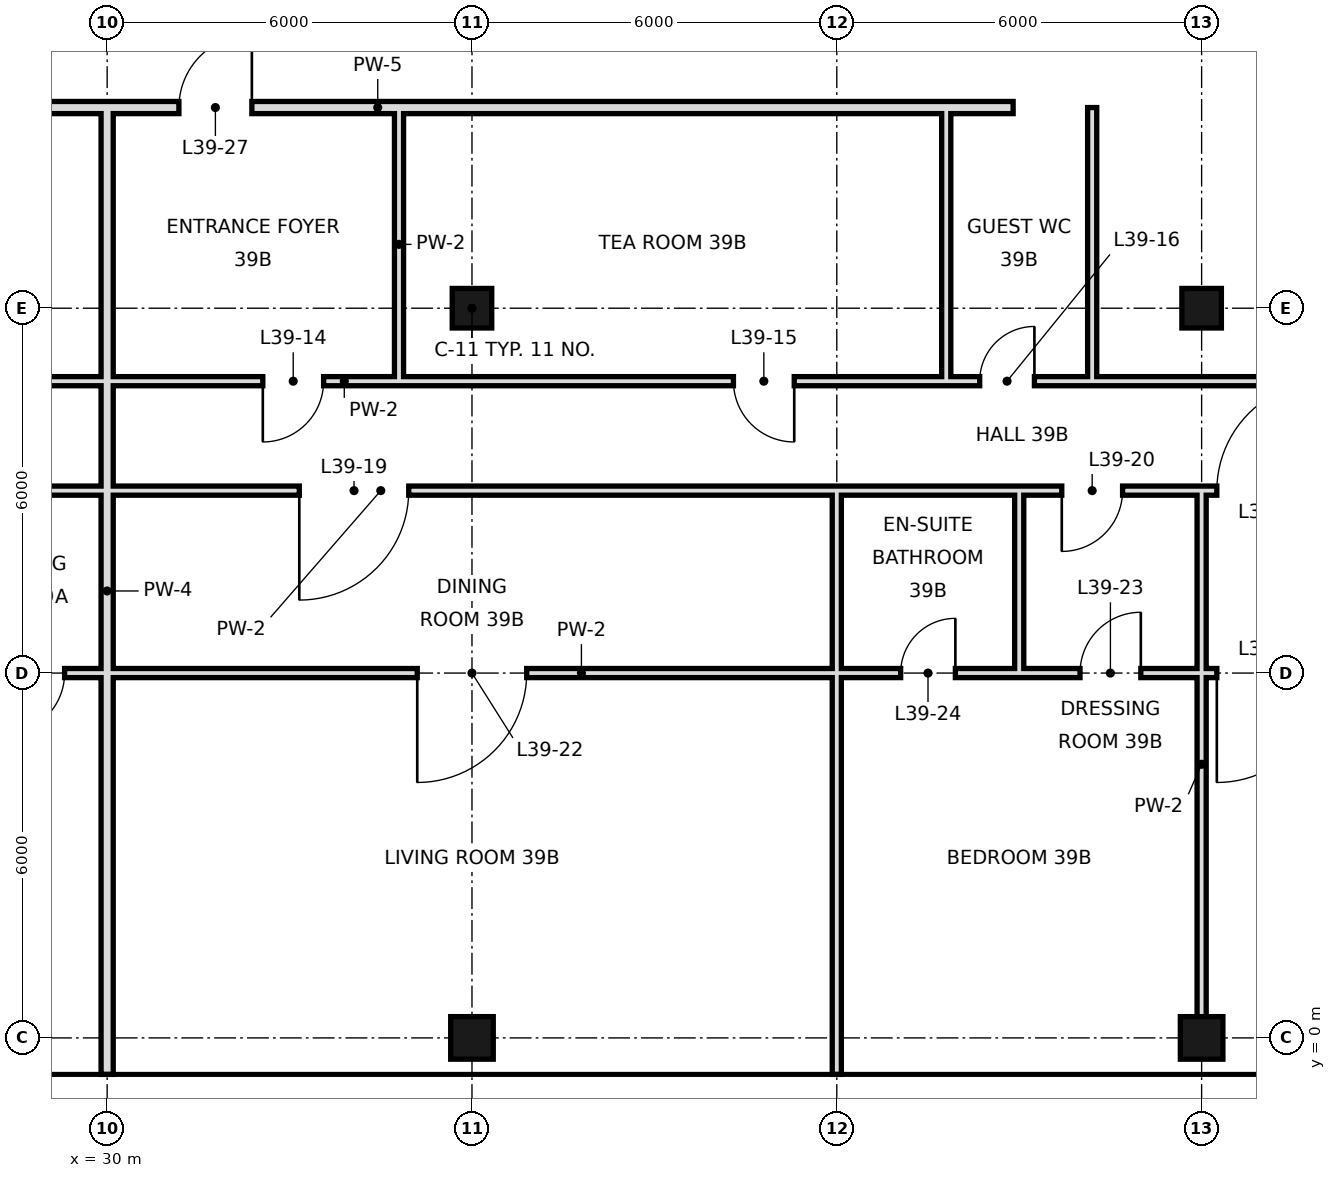
"""IFC4 building model, lengths in metres.
Left out: names, types, materials, properties, quantities, classifications, styles, units other than length and angle.
Written with IfcOpenShell. Run it as: python <this file> out.ifc"""

import sys

from ifc_helpers import new_model, si_unit, direction, frame, frame_2d, origin, origin_2d, place, context, subcontext, project, spatial, rectangle, hollow_rectangle, extrude, element, fill, save


model = new_model("IFC4")
c1 = context("Model", 3, precision=1e-05, world=origin(), true_north=direction((0.0, 1.0)))
c2 = subcontext(c1, "Body", "Model", "MODEL_VIEW")
j1 = project(units=[si_unit("LENGTHUNIT", "METRE"), si_unit("PLANEANGLEUNIT", "RADIAN")], contexts=[c1])
p1 = place(None, origin())
s1 = spatial("IfcSite", under=j1, at=p1, CompositionType="ELEMENT")
p2 = place(p1, origin())
s2 = spatial("IfcBuilding", under=s1, at=p2, CompositionType="ELEMENT")
p3 = place(p2, frame((0.0, 0.0, 170.8)))
s3 = spatial("IfcBuildingStorey", under=s2, at=p3, CompositionType="ELEMENT", Elevation=170.8)
p4 = place(p3, frame((36.0, 0.0, 0.0), z_axis=(0.0, 0.0, 1.0), x_axis=(1.0, 0.0, 0.0)))
e1 = element("IfcColumn", 1, at=p4, inside=s3, PredefinedType="COLUMN", context=c2, shape_type="SweptSolid", body=[
    extrude(hollow_rectangle(XDim=0.7, YDim=0.7, WallThickness=0.036, at=origin_2d()), origin(), (0.0, 0.0, 1.0), 3.6),
])
p5 = place(p3, frame((36.0, 12.0, 0.0), z_axis=(0.0, 0.0, 1.0), x_axis=(1.0, 0.0, 0.0)))
e2 = element("IfcColumn", 2, at=p5, inside=s3, PredefinedType="COLUMN", context=c2, shape_type="SweptSolid", body=[
    extrude(hollow_rectangle(XDim=0.65, YDim=0.65, WallThickness=0.032, at=origin_2d()), origin(), (0.0, 0.0, 1.0), 3.6),
])
p6 = place(p3, frame((48.0, 0.0, 0.0), z_axis=(0.0, 0.0, 1.0), x_axis=(1.0, 0.0, 0.0)))
e3 = element("IfcColumn", 3, at=p6, inside=s3, PredefinedType="COLUMN", context=c2, shape_type="SweptSolid", body=[
    extrude(hollow_rectangle(XDim=0.7, YDim=0.7, WallThickness=0.036, at=origin_2d()), origin(), (0.0, 0.0, 1.0), 3.6),
])
p7 = place(p3, frame((48.0, 12.0, 0.0), z_axis=(0.0, 0.0, 1.0), x_axis=(1.0, 0.0, 0.0)))
e4 = element("IfcColumn", 4, at=p7, inside=s3, PredefinedType="COLUMN", context=c2, shape_type="SweptSolid", body=[
    extrude(hollow_rectangle(XDim=0.65, YDim=0.65, WallThickness=0.032, at=origin_2d()), origin(), (0.0, 0.0, 1.0), 3.6),
])
p8 = place(p3, frame((30.0, -0.6, 0.0), z_axis=(0.0, 0.0, 1.0), x_axis=(0.0, 1.0, 0.0)))
e5 = element("IfcWall", 5, at=p8, inside=s3, PredefinedType="SOLIDWALL", context=c2, shape_type="SweptSolid", body=[
    extrude(rectangle(XDim=15.9, YDim=0.2, at=frame_2d((7.95, 0.0))), origin(), (0.0, 0.0, 1.0), 2.72),
])
p9 = place(p3, frame((34.8, 10.8, 0.0), z_axis=(0.0, 0.0, 1.0), x_axis=(0.0, 1.0, 0.0)))
e6 = element("IfcWall", 6, at=p9, inside=s3, PredefinedType="PARTITIONING", context=c2, shape_type="SweptSolid", body=[
    extrude(rectangle(XDim=4.5, YDim=0.15, at=frame_2d((2.25, 0.0))), origin(), (0.0, 0.0, 1.0), 3.42),
])
p10 = place(p3, frame((42.0, -0.6, 0.0), z_axis=(0.0, 0.0, 1.0), x_axis=(0.0, 1.0, 0.0)))
e7 = element("IfcWall", 7, at=p10, inside=s3, PredefinedType="PARTITIONING", context=c2, shape_type="SweptSolid", body=[
    extrude(rectangle(XDim=6.6, YDim=0.15, at=frame_2d((3.3, 0.0))), origin(), (0.0, 0.0, 1.0), 2.72),
])
p11 = place(p3, frame((42.0, 6.0, 0.0), z_axis=(0.0, 0.0, 1.0), x_axis=(0.0, 1.0, 0.0)))
e8 = element("IfcWall", 8, at=p11, inside=s3, PredefinedType="PARTITIONING", context=c2, shape_type="SweptSolid", body=[
    extrude(rectangle(XDim=3.0, YDim=0.15, at=frame_2d((1.5, 0.0))), origin(), (0.0, 0.0, 1.0), 2.72),
])
p12 = place(p3, frame((43.8, 10.8, 0.0), z_axis=(0.0, 0.0, 1.0), x_axis=(0.0, 1.0, 0.0)))
e9 = element("IfcWall", 9, at=p12, inside=s3, PredefinedType="PARTITIONING", context=c2, shape_type="SweptSolid", body=[
    extrude(rectangle(XDim=4.5, YDim=0.15, at=frame_2d((2.25, 0.0))), origin(), (0.0, 0.0, 1.0), 3.42),
])
p13 = place(p3, frame((45.0, 6.0, 0.0), z_axis=(0.0, 0.0, 1.0), x_axis=(0.0, 1.0, 0.0)))
e10 = element("IfcWall", 10, at=p13, inside=s3, PredefinedType="PARTITIONING", context=c2, shape_type="SweptSolid", body=[
    extrude(rectangle(XDim=3.0, YDim=0.15, at=frame_2d((1.5, 0.0))), origin(), (0.0, 0.0, 1.0), 3.42),
])
p14 = place(p3, frame((46.2, 10.8, 0.0), z_axis=(0.0, 0.0, 1.0), x_axis=(0.0, 1.0, 0.0)))
e11 = element("IfcWall", 11, at=p14, inside=s3, PredefinedType="PARTITIONING", context=c2, shape_type="SweptSolid", body=[
    extrude(rectangle(XDim=4.5, YDim=0.15, at=frame_2d((2.25, 0.0))), origin(), (0.0, 0.0, 1.0), 3.42),
])
p15 = place(p3, frame((48.0, 0.0, 0.0), z_axis=(0.0, 0.0, 1.0), x_axis=(0.0, 1.0, 0.0)))
e12 = element("IfcWall", 12, at=p15, inside=s3, PredefinedType="PARTITIONING", context=c2, shape_type="SweptSolid", body=[
    extrude(rectangle(XDim=9.0, YDim=0.15, at=frame_2d((4.5, 0.0))), origin(), (0.0, 0.0, 1.0), 2.72),
])
p16 = place(p3, frame((24.0, 10.8, 0.0), z_axis=(0.0, 0.0, 1.0), x_axis=(1.0, 0.0, 0.0)))
e13 = element("IfcWall", 13, at=p16, inside=s3, PredefinedType="PARTITIONING", context=c2, shape_type="SweptSolid", body=[
    extrude(rectangle(XDim=19.8, YDim=0.15, at=frame_2d((9.9, 0.0))), origin(), (0.0, 0.0, 1.0), 3.42),
])
p17 = place(p16, frame((2.5, 0.0, 0.0)))
e14 = element("IfcOpeningElement", 14, at=p17, cuts=e13, PredefinedType="OPENING", context=c2, shape_type="SweptSolid", body=[
    extrude(rectangle(XDim=1.0, YDim=2.4, at=frame_2d((0.5, 1.2))), frame((0.0, 0.085, 0.0), z_axis=(0.0, -1.0, 0.0), x_axis=(1.0, 0.0, 0.0)), (0.0, 0.0, 1.0), 0.17),
])
p18 = place(p16, frame((8.56, 0.0, 0.0)))
e15 = element("IfcOpeningElement", 15, at=p18, cuts=e13, PredefinedType="OPENING", context=c2, shape_type="SweptSolid", body=[
    extrude(rectangle(XDim=1.0, YDim=2.4, at=frame_2d((0.5, 1.2))), frame((0.0, 0.085, 0.0), z_axis=(0.0, -1.0, 0.0), x_axis=(1.0, 0.0, 0.0)), (0.0, 0.0, 1.0), 0.17),
])
p19 = place(p16, frame((16.3, 0.0, 0.0)))
e16 = element("IfcOpeningElement", 16, at=p19, cuts=e13, PredefinedType="OPENING", context=c2, shape_type="SweptSolid", body=[
    extrude(rectangle(XDim=1.0, YDim=2.4, at=frame_2d((0.5, 1.2))), frame((0.0, 0.085, 0.0), z_axis=(0.0, -1.0, 0.0), x_axis=(1.0, 0.0, 0.0)), (0.0, 0.0, 1.0), 0.17),
])
p20 = place(p3, frame((46.2, 10.8, 0.0), z_axis=(0.0, 0.0, 1.0), x_axis=(1.0, 0.0, 0.0)))
e17 = element("IfcWall", 17, at=p20, inside=s3, PredefinedType="PARTITIONING", context=c2, shape_type="SweptSolid", body=[
    extrude(rectangle(XDim=9.0, YDim=0.15, at=frame_2d((4.5, 0.0))), origin(), (0.0, 0.0, 1.0), 3.42),
])
p21 = place(p20, frame((5.5, 0.0, 0.0)))
e18 = element("IfcOpeningElement", 18, at=p21, cuts=e17, PredefinedType="OPENING", context=c2, shape_type="SweptSolid", body=[
    extrude(rectangle(XDim=1.0, YDim=2.4, at=frame_2d((0.5, 1.2))), frame((0.0, 0.085, 0.0), z_axis=(0.0, -1.0, 0.0), x_axis=(1.0, 0.0, 0.0)), (0.0, 0.0, 1.0), 0.17),
])
p22 = place(p3, frame((43.8, 10.8, 0.0), z_axis=(0.0, 0.0, 1.0), x_axis=(1.0, 0.0, 0.0)))
e19 = element("IfcWall", 19, at=p22, inside=s3, PredefinedType="PARTITIONING", context=c2, shape_type="SweptSolid", body=[
    extrude(rectangle(XDim=2.4, YDim=0.15, at=frame_2d((1.2, 0.0))), origin(), (0.0, 0.0, 1.0), 3.42),
])
p23 = place(p22, frame((0.55, 0.0, 0.0)))
e20 = element("IfcOpeningElement", 20, at=p23, cuts=e19, PredefinedType="OPENING", context=c2, shape_type="SweptSolid", body=[
    extrude(rectangle(XDim=0.9, YDim=2.4, at=frame_2d((0.45, 1.2))), frame((0.0, 0.085, 0.0), z_axis=(0.0, -1.0, 0.0), x_axis=(1.0, 0.0, 0.0)), (0.0, 0.0, 1.0), 0.17),
])
p24 = place(p3, frame((24.0, 15.3, 0.0), z_axis=(0.0, 0.0, 1.0), x_axis=(1.0, 0.0, 0.0)))
e21 = element("IfcWall", 21, at=p24, inside=s3, PredefinedType="SOLIDWALL", context=c2, shape_type="SweptSolid", body=[
    extrude(rectangle(XDim=20.9, YDim=0.2, at=frame_2d((10.45, 0.0))), origin(), (0.0, 0.0, 1.0), 2.72),
])
p25 = place(p24, frame((3.26, 0.0, 0.0)))
e22 = element("IfcOpeningElement", 22, at=p25, cuts=e21, PredefinedType="OPENING", context=c2, shape_type="SweptSolid", body=[
    extrude(rectangle(XDim=1.2, YDim=2.4, at=frame_2d((0.6, 1.2))), frame((0.0, 0.11, 0.0), z_axis=(0.0, -1.0, 0.0), x_axis=(1.0, 0.0, 0.0)), (0.0, 0.0, 1.0), 0.22),
])
p26 = place(p24, frame((7.18, 0.0, 0.0)))
e23 = element("IfcOpeningElement", 23, at=p26, cuts=e21, PredefinedType="OPENING", context=c2, shape_type="SweptSolid", body=[
    extrude(rectangle(XDim=1.2, YDim=2.4, at=frame_2d((0.6, 1.2))), frame((0.0, 0.11, 0.0), z_axis=(0.0, -1.0, 0.0), x_axis=(1.0, 0.0, 0.0)), (0.0, 0.0, 1.0), 0.22),
])
p27 = place(p3, frame((27.0, 6.0, 0.0), z_axis=(0.0, 0.0, 1.0), x_axis=(1.0, 0.0, 0.0)))
e24 = element("IfcWall", 24, at=p27, inside=s3, PredefinedType="PARTITIONING", context=c2, shape_type="SweptSolid", body=[
    extrude(rectangle(XDim=15.0, YDim=0.15, at=frame_2d((7.5, 0.0))), origin(), (0.0, 0.0, 1.0), 2.97),
])
p28 = place(p27, frame((1.3, 0.0, 0.0)))
e25 = element("IfcOpeningElement", 25, at=p28, cuts=e24, PredefinedType="OPENING", context=c2, shape_type="SweptSolid", body=[
    extrude(rectangle(XDim=1.0, YDim=2.4, at=frame_2d((0.5, 1.2))), frame((0.0, 0.085, 0.0), z_axis=(0.0, -1.0, 0.0), x_axis=(1.0, 0.0, 0.0)), (0.0, 0.0, 1.0), 0.17),
])
p29 = place(p27, frame((8.1, 0.0, 0.0)))
e26 = element("IfcOpeningElement", 26, at=p29, cuts=e24, PredefinedType="OPENING", context=c2, shape_type="SweptSolid", body=[
    extrude(rectangle(XDim=1.8, YDim=2.4, at=frame_2d((0.9, 1.2))), frame((0.0, 0.085, 0.0), z_axis=(0.0, -1.0, 0.0), x_axis=(1.0, 0.0, 0.0)), (0.0, 0.0, 1.0), 0.17),
])
p30 = place(p3, frame((45.0, 6.0, 0.0), z_axis=(0.0, 0.0, 1.0), x_axis=(1.0, 0.0, 0.0)))
e27 = element("IfcWall", 27, at=p30, inside=s3, PredefinedType="PARTITIONING", context=c2, shape_type="SweptSolid", body=[
    extrude(rectangle(XDim=15.0, YDim=0.15, at=frame_2d((7.5, 0.0))), origin(), (0.0, 0.0, 1.0), 2.72),
])
p31 = place(p30, frame((1.0, 0.0, 0.0)))
e28 = element("IfcOpeningElement", 28, at=p31, cuts=e27, PredefinedType="OPENING", context=c2, shape_type="SweptSolid", body=[
    extrude(rectangle(XDim=1.0, YDim=2.4, at=frame_2d((0.5, 1.2))), frame((0.0, 0.085, 0.0), z_axis=(0.0, -1.0, 0.0), x_axis=(1.0, 0.0, 0.0)), (0.0, 0.0, 1.0), 0.17),
])
p32 = place(p30, frame((3.25, 0.0, 0.0)))
e29 = element("IfcOpeningElement", 29, at=p32, cuts=e27, PredefinedType="OPENING", context=c2, shape_type="SweptSolid", body=[
    extrude(rectangle(XDim=1.8, YDim=2.4, at=frame_2d((0.9, 1.2))), frame((0.0, 0.085, 0.0), z_axis=(0.0, -1.0, 0.0), x_axis=(1.0, 0.0, 0.0)), (0.0, 0.0, 1.0), 0.17),
])
p33 = place(p3, frame((42.0, 6.0, 0.0), z_axis=(0.0, 0.0, 1.0), x_axis=(1.0, 0.0, 0.0)))
e30 = element("IfcWall", 30, at=p33, inside=s3, PredefinedType="PARTITIONING", context=c2, shape_type="SweptSolid", body=[
    extrude(rectangle(XDim=3.0, YDim=0.15, at=frame_2d((1.5, 0.0))), origin(), (0.0, 0.0, 1.0), 2.97),
])
p34 = place(p33, frame((1.05, 0.0, 0.0)))
e31 = element("IfcOpeningElement", 31, at=p34, cuts=e30, PredefinedType="OPENING", context=c2, shape_type="SweptSolid", body=[
    extrude(rectangle(XDim=0.9, YDim=2.4, at=frame_2d((0.45, 1.2))), frame((0.0, 0.085, 0.0), z_axis=(0.0, -1.0, 0.0), x_axis=(1.0, 0.0, 0.0)), (0.0, 0.0, 1.0), 0.17),
])
p35 = place(p3, frame((27.0, 9.0, 0.0), z_axis=(0.0, 0.0, 1.0), x_axis=(1.0, 0.0, 0.0)))
e32 = element("IfcWall", 32, at=p35, inside=s3, PredefinedType="PARTITIONING", context=c2, shape_type="SweptSolid", body=[
    extrude(rectangle(XDim=15.0, YDim=0.15, at=frame_2d((7.5, 0.0))), origin(), (0.0, 0.0, 1.0), 3.42),
])
p36 = place(p35, frame((1.0, 0.0, 0.0)))
e33 = element("IfcOpeningElement", 33, at=p36, cuts=e32, PredefinedType="OPENING", context=c2, shape_type="SweptSolid", body=[
    extrude(rectangle(XDim=1.0, YDim=2.4, at=frame_2d((0.5, 1.2))), frame((0.0, 0.085, 0.0), z_axis=(0.0, -1.0, 0.0), x_axis=(1.0, 0.0, 0.0)), (0.0, 0.0, 1.0), 0.17),
])
p37 = place(p35, frame((6.16, 0.0, 0.0)))
e34 = element("IfcOpeningElement", 34, at=p37, cuts=e32, PredefinedType="OPENING", context=c2, shape_type="SweptSolid", body=[
    extrude(rectangle(XDim=1.8, YDim=2.4, at=frame_2d((0.9, 1.2))), frame((0.0, 0.085, 0.0), z_axis=(0.0, -1.0, 0.0), x_axis=(1.0, 0.0, 0.0)), (0.0, 0.0, 1.0), 0.17),
])
p38 = place(p3, frame((45.0, 9.0, 0.0), z_axis=(0.0, 0.0, 1.0), x_axis=(1.0, 0.0, 0.0)))
e35 = element("IfcWall", 35, at=p38, inside=s3, PredefinedType="PARTITIONING", context=c2, shape_type="SweptSolid", body=[
    extrude(rectangle(XDim=15.6, YDim=0.15, at=frame_2d((7.8, 0.0))), origin(), (0.0, 0.0, 1.0), 3.42),
])
p39 = place(p38, frame((0.7, 0.0, 0.0)))
e36 = element("IfcOpeningElement", 36, at=p39, cuts=e35, PredefinedType="OPENING", context=c2, shape_type="SweptSolid", body=[
    extrude(rectangle(XDim=1.0, YDim=2.4, at=frame_2d((0.5, 1.2))), frame((0.0, 0.085, 0.0), z_axis=(0.0, -1.0, 0.0), x_axis=(1.0, 0.0, 0.0)), (0.0, 0.0, 1.0), 0.17),
])
p40 = place(p38, frame((3.25, 0.0, 0.0)))
e37 = element("IfcOpeningElement", 37, at=p40, cuts=e35, PredefinedType="OPENING", context=c2, shape_type="SweptSolid", body=[
    extrude(rectangle(XDim=1.8, YDim=2.4, at=frame_2d((0.9, 1.2))), frame((0.0, 0.085, 0.0), z_axis=(0.0, -1.0, 0.0), x_axis=(1.0, 0.0, 0.0)), (0.0, 0.0, 1.0), 0.17),
])
p41 = place(p3, frame((42.0, 9.0, 0.0), z_axis=(0.0, 0.0, 1.0), x_axis=(1.0, 0.0, 0.0)))
e38 = element("IfcWall", 38, at=p41, inside=s3, PredefinedType="PARTITIONING", context=c2, shape_type="SweptSolid", body=[
    extrude(rectangle(XDim=3.0, YDim=0.15, at=frame_2d((1.5, 0.0))), origin(), (0.0, 0.0, 1.0), 3.42),
])
p42 = place(p28, frame((1.0, 0.0, 0.0), z_axis=(0.0, 0.0, 1.0), x_axis=(-1.0, 0.0, 0.0)))
e39 = element("IfcDoor", 39, at=p42, inside=s3, OperationType="SINGLE_SWING_RIGHT", PredefinedType="DOOR", context=c2, shape_type="SweptSolid", body=[
    extrude(rectangle(XDim=1.0, YDim=2.4, at=frame_2d((0.5, 1.2))), frame((0.0, 0.025, 0.0), z_axis=(0.0, -1.0, 0.0), x_axis=(1.0, 0.0, 0.0)), (0.0, 0.0, 1.0), 0.05),
])
fill(e25, e39)
p43 = place(p18, frame((1.0, 0.0, 0.0), z_axis=(0.0, 0.0, 1.0), x_axis=(-1.0, 0.0, 0.0)))
e40 = element("IfcDoor", 40, at=p43, inside=s3, OperationType="SINGLE_SWING_RIGHT", PredefinedType="DOOR", context=c2, shape_type="SweptSolid", body=[
    extrude(rectangle(XDim=1.0, YDim=2.4, at=frame_2d((0.5, 1.2))), frame((0.0, 0.025, 0.0), z_axis=(0.0, -1.0, 0.0), x_axis=(1.0, 0.0, 0.0)), (0.0, 0.0, 1.0), 0.05),
])
fill(e15, e40)
p44 = place(p19, origin())
e41 = element("IfcDoor", 41, at=p44, inside=s3, OperationType="SINGLE_SWING_RIGHT", PredefinedType="DOOR", context=c2, shape_type="SweptSolid", body=[
    extrude(rectangle(XDim=1.0, YDim=2.4, at=frame_2d((0.5, 1.2))), frame((0.0, 0.025, 0.0), z_axis=(0.0, -1.0, 0.0), x_axis=(1.0, 0.0, 0.0)), (0.0, 0.0, 1.0), 0.05),
])
fill(e16, e41)
p45 = place(p23, frame((0.9, 0.0, 0.0), z_axis=(0.0, 0.0, 1.0), x_axis=(-1.0, 0.0, 0.0)))
e42 = element("IfcDoor", 42, at=p45, inside=s3, OperationType="SINGLE_SWING_LEFT", PredefinedType="DOOR", context=c2, shape_type="SweptSolid", body=[
    extrude(rectangle(XDim=0.9, YDim=2.4, at=frame_2d((0.45, 1.2))), frame((0.0, 0.025, 0.0), z_axis=(0.0, -1.0, 0.0), x_axis=(1.0, 0.0, 0.0)), (0.0, 0.0, 1.0), 0.05),
])
fill(e20, e42)
p46 = place(p37, frame((1.8, 0.0, 0.0), z_axis=(0.0, 0.0, 1.0), x_axis=(-1.0, 0.0, 0.0)))
e43 = element("IfcDoor", 43, at=p46, inside=s3, OperationType="SINGLE_SWING_RIGHT", PredefinedType="DOOR", context=c2, shape_type="SweptSolid", body=[
    extrude(rectangle(XDim=1.8, YDim=2.4, at=frame_2d((0.9, 1.2))), frame((0.0, 0.025, 0.0), z_axis=(0.0, -1.0, 0.0), x_axis=(1.0, 0.0, 0.0)), (0.0, 0.0, 1.0), 0.05),
])
fill(e34, e43)
p47 = place(p39, frame((1.0, 0.0, 0.0), z_axis=(0.0, 0.0, 1.0), x_axis=(-1.0, 0.0, 0.0)))
e44 = element("IfcDoor", 44, at=p47, inside=s3, OperationType="SINGLE_SWING_RIGHT", PredefinedType="DOOR", context=c2, shape_type="SweptSolid", body=[
    extrude(rectangle(XDim=1.0, YDim=2.4, at=frame_2d((0.5, 1.2))), frame((0.0, 0.025, 0.0), z_axis=(0.0, -1.0, 0.0), x_axis=(1.0, 0.0, 0.0)), (0.0, 0.0, 1.0), 0.05),
])
fill(e36, e44)
p48 = place(p40, frame((1.8, 0.0, 0.0), z_axis=(0.0, 0.0, 1.0), x_axis=(-1.0, 0.0, 0.0)))
e45 = element("IfcDoor", 45, at=p48, inside=s3, OperationType="SINGLE_SWING_LEFT", PredefinedType="DOOR", context=c2, shape_type="SweptSolid", body=[
    extrude(rectangle(XDim=1.8, YDim=2.4, at=frame_2d((0.9, 1.2))), frame((0.0, 0.025, 0.0), z_axis=(0.0, -1.0, 0.0), x_axis=(1.0, 0.0, 0.0)), (0.0, 0.0, 1.0), 0.05),
])
fill(e37, e45)
p49 = place(p29, frame((1.8, 0.0, 0.0), z_axis=(0.0, 0.0, 1.0), x_axis=(-1.0, 0.0, 0.0)))
e46 = element("IfcDoor", 46, at=p49, inside=s3, OperationType="SINGLE_SWING_RIGHT", PredefinedType="DOOR", context=c2, shape_type="SweptSolid", body=[
    extrude(rectangle(XDim=1.8, YDim=2.4, at=frame_2d((0.9, 1.2))), frame((0.0, 0.025, 0.0), z_axis=(0.0, -1.0, 0.0), x_axis=(1.0, 0.0, 0.0)), (0.0, 0.0, 1.0), 0.05),
])
fill(e26, e46)
p50 = place(p31, frame((1.0, 0.0, 0.0), z_axis=(0.0, 0.0, 1.0), x_axis=(-1.0, 0.0, 0.0)))
e47 = element("IfcDoor", 47, at=p50, inside=s3, OperationType="SINGLE_SWING_LEFT", PredefinedType="DOOR", context=c2, shape_type="SweptSolid", body=[
    extrude(rectangle(XDim=1.0, YDim=2.4, at=frame_2d((0.5, 1.2))), frame((0.0, 0.025, 0.0), z_axis=(0.0, -1.0, 0.0), x_axis=(1.0, 0.0, 0.0)), (0.0, 0.0, 1.0), 0.05),
])
fill(e28, e47)
p51 = place(p34, frame((0.9, 0.0, 0.0), z_axis=(0.0, 0.0, 1.0), x_axis=(-1.0, 0.0, 0.0)))
e48 = element("IfcDoor", 48, at=p51, inside=s3, OperationType="SINGLE_SWING_LEFT", PredefinedType="DOOR", context=c2, shape_type="SweptSolid", body=[
    extrude(rectangle(XDim=0.9, YDim=2.4, at=frame_2d((0.45, 1.2))), frame((0.0, 0.025, 0.0), z_axis=(0.0, -1.0, 0.0), x_axis=(1.0, 0.0, 0.0)), (0.0, 0.0, 1.0), 0.05),
])
fill(e31, e48)
p52 = place(p32, frame((1.8, 0.0, 0.0), z_axis=(0.0, 0.0, 1.0), x_axis=(-1.0, 0.0, 0.0)))
e49 = element("IfcDoor", 49, at=p52, inside=s3, OperationType="SINGLE_SWING_RIGHT", PredefinedType="DOOR", context=c2, shape_type="SweptSolid", body=[
    extrude(rectangle(XDim=1.8, YDim=2.4, at=frame_2d((0.9, 1.2))), frame((0.0, 0.025, 0.0), z_axis=(0.0, -1.0, 0.0), x_axis=(1.0, 0.0, 0.0)), (0.0, 0.0, 1.0), 0.05),
])
fill(e29, e49)
p53 = place(p26, frame((1.2, 0.0, 0.0), z_axis=(0.0, 0.0, 1.0), x_axis=(-1.0, 0.0, 0.0)))
e50 = element("IfcDoor", 50, at=p53, inside=s3, OperationType="SINGLE_SWING_LEFT", PredefinedType="DOOR", context=c2, shape_type="SweptSolid", body=[
    extrude(rectangle(XDim=1.2, YDim=2.4, at=frame_2d((0.6, 1.2))), frame((0.0, 0.025, 0.0), z_axis=(0.0, -1.0, 0.0), x_axis=(1.0, 0.0, 0.0)), (0.0, 0.0, 1.0), 0.05),
])
fill(e23, e50)
save(model, sys.argv[1])
